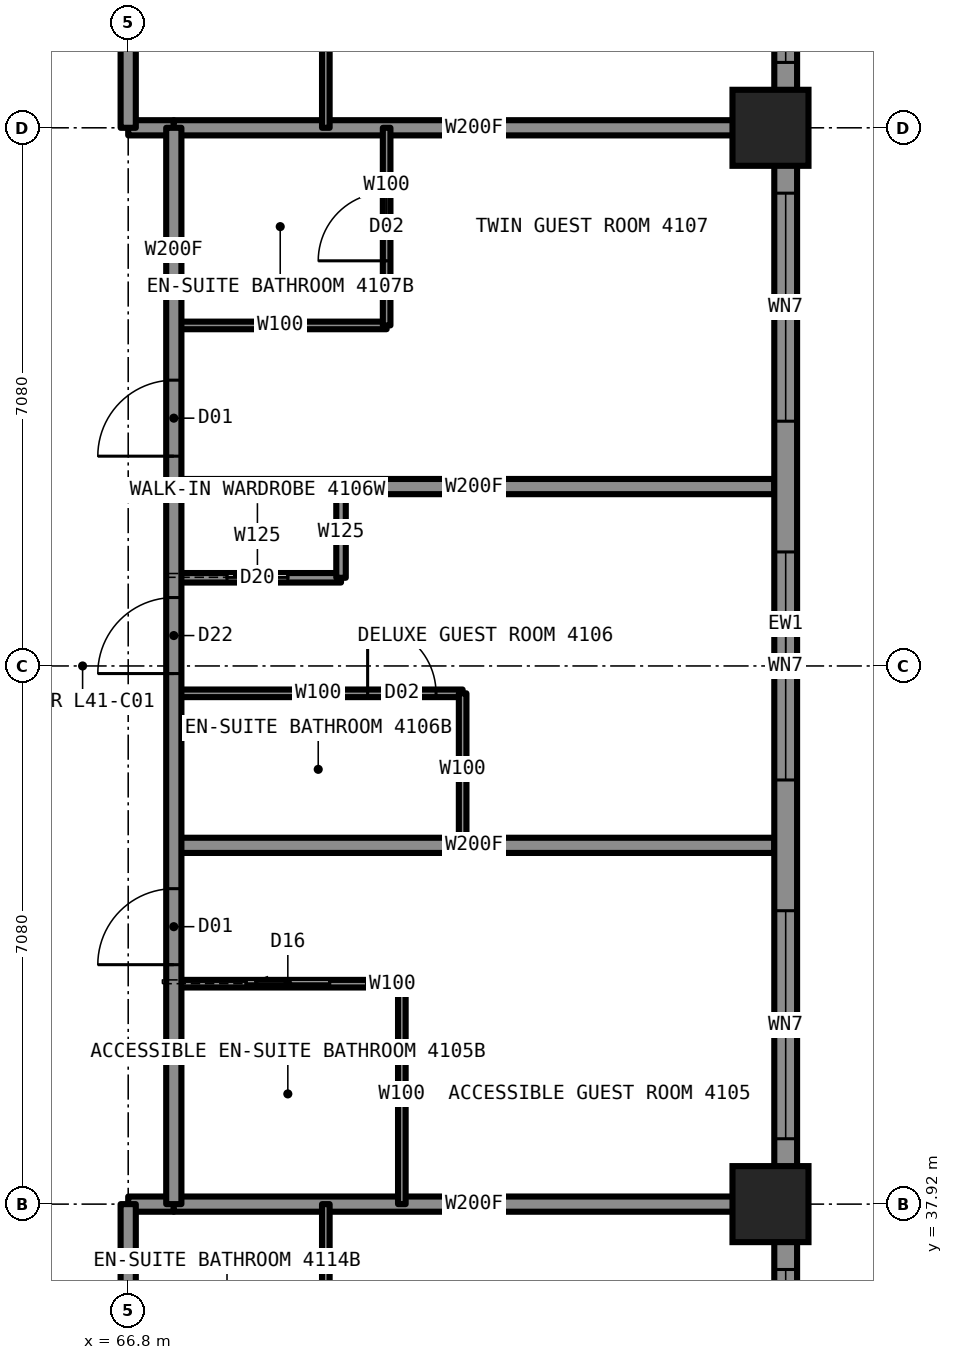
"""IFC4 building model, lengths in metres.
Left out: names, types, materials, properties, quantities, classifications, styles, units other than length and angle.
Written with IfcOpenShell. Run it as: python <this file> out.ifc"""

import sys

from ifc_helpers import new_model, si_unit, direction, frame, frame_2d, origin, origin_2d, place, context, subcontext, project, spatial, rectangle, i_section, extrude, element, fill, save


model = new_model("IFC4")
c1 = context("Model", 3, precision=1e-05, world=origin(), true_north=direction((0.0, 1.0)))
c2 = subcontext(c1, "Body", "Model", "MODEL_VIEW")
j1 = project(units=[si_unit("LENGTHUNIT", "METRE"), si_unit("PLANEANGLEUNIT", "RADIAN")], contexts=[c1])
p1 = place(None, origin())
s1 = spatial("IfcSite", under=j1, at=p1, CompositionType="ELEMENT")
p2 = place(p1, origin())
s2 = spatial("IfcBuilding", under=s1, at=p2, CompositionType="ELEMENT")
p3 = place(p2, frame((0.0, 0.0, 145.9)))
s3 = spatial("IfcBuildingStorey", under=s2, at=p3, CompositionType="ELEMENT", Elevation=145.9)
for number, where, z_axis, x_axis in (
    (1, (75.25, 37.92, 0.0), (0.0, 0.0, 1.0), (1.0, 0.0, 0.0)),
    (2, (75.25, 52.08, 0.0), (0.0, 0.0, 1.0), (1.0, 0.0, 0.0)),
):
    element("IfcColumn", number, at=place(p3, frame(where, z_axis=z_axis, x_axis=x_axis)), inside=s3, PredefinedType="COLUMN", context=c2, shape_type="SweptSolid", body=[
        extrude(i_section(OverallWidth=0.422, OverallDepth=0.465, WebThickness=0.045, FlangeThickness=0.073, at=origin_2d()), origin(), (0.0, 0.0, 1.0), 3.5),
    ])
p4 = place(p3, frame((66.8, 44.64, 0.0), z_axis=(0.0, 0.0, 1.0), x_axis=(1.0, 0.0, 0.0)))
e3 = element("IfcWall", 3, at=p4, inside=s3, PredefinedType="PARTITIONING", context=c2, shape_type="SweptSolid", body=[
    extrude(rectangle(XDim=3.8, YDim=0.1, at=frame_2d((1.9, 0.0))), origin(), (0.0, 0.0, 1.0), 3.33),
])
p5 = place(p4, frame((2.55, 0.0, 0.0)))
e4 = element("IfcOpeningElement", 4, at=p5, cuts=e3, PredefinedType="OPENING", context=c2, shape_type="SweptSolid", body=[
    extrude(rectangle(XDim=0.9, YDim=2.1, at=frame_2d((0.45, 1.05))), frame((0.0, 0.06, 0.0), z_axis=(0.0, -1.0, 0.0), x_axis=(1.0, 0.0, 0.0)), (0.0, 0.0, 1.0), 0.12),
])
p6 = place(p3, frame((66.8, 42.64, 0.0), z_axis=(0.0, 0.0, 1.0), x_axis=(1.0, 0.0, 0.0)))
e5 = element("IfcWall", 5, at=p6, inside=s3, PredefinedType="PARTITIONING", context=c2, shape_type="SweptSolid", body=[
    extrude(rectangle(XDim=8.5, YDim=0.2, at=frame_2d((4.25, 0.0))), origin(), (0.0, 0.0, 1.0), 2.731),
])
p7 = place(p3, frame((66.8, 40.82, 0.0), z_axis=(0.0, 0.0, 1.0), x_axis=(1.0, 0.0, 0.0)))
e6 = element("IfcWall", 6, at=p7, inside=s3, PredefinedType="PARTITIONING", context=c2, shape_type="SweptSolid", body=[
    extrude(rectangle(XDim=3.0, YDim=0.1, at=frame_2d((1.5, 0.0))), origin(), (0.0, 0.0, 1.0), 3.33),
])
p8 = place(p7, frame((0.95, 0.0, 0.0)))
e7 = element("IfcOpeningElement", 7, at=p8, cuts=e6, PredefinedType="OPENING", context=c2, shape_type="SweptSolid", body=[
    extrude(rectangle(XDim=1.1, YDim=2.1, at=frame_2d((0.55, 1.05))), frame((0.0, 0.06, 0.0), z_axis=(0.0, -1.0, 0.0), x_axis=(1.0, 0.0, 0.0)), (0.0, 0.0, 1.0), 0.12),
])
p9 = place(p3, frame((66.8, 37.92, 0.0), z_axis=(0.0, 0.0, 1.0), x_axis=(1.0, 0.0, 0.0)))
e8 = element("IfcWall", 8, at=p9, inside=s3, PredefinedType="PARTITIONING", context=c2, shape_type="SweptSolid", body=[
    extrude(rectangle(XDim=8.5, YDim=0.2, at=frame_2d((4.25, 0.0))), origin(), (0.0, 0.0, 1.0), 2.573),
])
p10 = place(p3, frame((66.8, 46.16, 0.0), z_axis=(0.0, 0.0, 1.0), x_axis=(1.0, 0.0, 0.0)))
e9 = element("IfcWall", 9, at=p10, inside=s3, PredefinedType="PARTITIONING", context=c2, shape_type="SweptSolid", body=[
    extrude(rectangle(XDim=2.2, YDim=0.125, at=frame_2d((1.1, 0.0))), origin(), (0.0, 0.0, 1.0), 3.33),
])
p11 = place(p10, frame((0.7, 0.0, 0.0)))
e10 = element("IfcOpeningElement", 10, at=p11, cuts=e9, PredefinedType="OPENING", context=c2, shape_type="SweptSolid", body=[
    extrude(rectangle(XDim=0.8, YDim=2.1, at=frame_2d((0.4, 1.05))), frame((0.0, 0.073, 0.0), z_axis=(0.0, -1.0, 0.0), x_axis=(1.0, 0.0, 0.0)), (0.0, 0.0, 1.0), 0.145),
])
p12 = place(p3, frame((66.8, 47.36, 0.0), z_axis=(0.0, 0.0, 1.0), x_axis=(1.0, 0.0, 0.0)))
e11 = element("IfcWall", 11, at=p12, inside=s3, PredefinedType="PARTITIONING", context=c2, shape_type="SweptSolid", body=[
    extrude(rectangle(XDim=8.5, YDim=0.2, at=frame_2d((4.25, 0.0))), origin(), (0.0, 0.0, 1.0), 2.731),
])
p13 = place(p3, frame((66.8, 49.48, 0.0), z_axis=(0.0, 0.0, 1.0), x_axis=(1.0, 0.0, 0.0)))
e12 = element("IfcWall", 12, at=p13, inside=s3, PredefinedType="PARTITIONING", context=c2, shape_type="SweptSolid", body=[
    extrude(rectangle(XDim=2.8, YDim=0.1, at=frame_2d((1.4, 0.0))), origin(), (0.0, 0.0, 1.0), 3.33),
])
p14 = place(p3, frame((66.8, 52.08, 0.0), z_axis=(0.0, 0.0, 1.0), x_axis=(1.0, 0.0, 0.0)))
e13 = element("IfcWall", 13, at=p14, inside=s3, PredefinedType="PARTITIONING", context=c2, shape_type="SweptSolid", body=[
    extrude(rectangle(XDim=2.6, YDim=0.2, at=frame_2d((1.3, 0.0))), origin(), (0.0, 0.0, 1.0), 2.573),
])
p15 = place(p3, frame((69.6, 52.08, 0.0), z_axis=(0.0, 0.0, 1.0), x_axis=(1.0, 0.0, 0.0)))
e14 = element("IfcWall", 14, at=p15, inside=s3, PredefinedType="PARTITIONING", context=c2, shape_type="SweptSolid", body=[
    extrude(rectangle(XDim=5.7, YDim=0.2, at=frame_2d((2.85, 0.0))), origin(), (0.0, 0.0, 1.0), 2.573),
])
p16 = place(p3, frame((66.8, 33.2, 0.0), z_axis=(0.0, 0.0, 1.0), x_axis=(0.0, 1.0, 0.0)))
e15 = element("IfcWall", 15, at=p16, inside=s3, PredefinedType="PARTITIONING", context=c2, shape_type="SweptSolid", body=[
    extrude(rectangle(XDim=23.6, YDim=0.2, at=frame_2d((11.8, 0.0))), origin(), (0.0, 0.0, 1.0), 3.33),
])
p17 = place(p16, frame((7.87, 0.0, 0.0)))
e16 = element("IfcOpeningElement", 16, at=p17, cuts=e15, PredefinedType="OPENING", context=c2, shape_type="SweptSolid", body=[
    extrude(rectangle(XDim=1.0, YDim=2.2, at=frame_2d((0.5, 1.1))), frame((0.0, 0.11, 0.0), z_axis=(0.0, -1.0, 0.0), x_axis=(1.0, 0.0, 0.0)), (0.0, 0.0, 1.0), 0.22),
])
p18 = place(p16, frame((11.7, 0.0, 0.0)))
e17 = element("IfcOpeningElement", 17, at=p18, cuts=e15, PredefinedType="OPENING", context=c2, shape_type="SweptSolid", body=[
    extrude(rectangle(XDim=1.0, YDim=2.2, at=frame_2d((0.5, 1.1))), frame((0.0, 0.11, 0.0), z_axis=(0.0, -1.0, 0.0), x_axis=(1.0, 0.0, 0.0)), (0.0, 0.0, 1.0), 0.22),
])
p19 = place(p16, frame((14.56, 0.0, 0.0)))
e18 = element("IfcOpeningElement", 18, at=p19, cuts=e15, PredefinedType="OPENING", context=c2, shape_type="SweptSolid", body=[
    extrude(rectangle(XDim=1.0, YDim=2.2, at=frame_2d((0.5, 1.1))), frame((0.0, 0.11, 0.0), z_axis=(0.0, -1.0, 0.0), x_axis=(1.0, 0.0, 0.0)), (0.0, 0.0, 1.0), 0.22),
])
p20 = place(p16, frame((21.84, 0.0, 0.0)))
e19 = element("IfcOpeningElement", 19, at=p20, cuts=e15, PredefinedType="OPENING", context=c2, shape_type="SweptSolid", body=[
    extrude(rectangle(XDim=1.1, YDim=2.2, at=frame_2d((0.55, 1.1))), frame((0.0, 0.11, 0.0), z_axis=(0.0, -1.0, 0.0), x_axis=(1.0, 0.0, 0.0)), (0.0, 0.0, 1.0), 0.22),
])
p21 = place(p16, frame((0.66, 0.0, 0.0)))
e20 = element("IfcOpeningElement", 20, at=p21, cuts=e15, PredefinedType="OPENING", context=c2, shape_type="SweptSolid", body=[
    extrude(rectangle(XDim=1.1, YDim=2.2, at=frame_2d((0.55, 1.1))), frame((0.0, 0.11, 0.0), z_axis=(0.0, -1.0, 0.0), x_axis=(1.0, 0.0, 0.0)), (0.0, 0.0, 1.0), 0.22),
])
p22 = place(p3, frame((69.0, 46.16, 0.0), z_axis=(0.0, 0.0, 1.0), x_axis=(0.0, 1.0, 0.0)))
e21 = element("IfcWall", 21, at=p22, inside=s3, PredefinedType="PARTITIONING", context=c2, shape_type="SweptSolid", body=[
    extrude(rectangle(XDim=1.2, YDim=0.125, at=frame_2d((0.6, 0.0))), origin(), (0.0, 0.0, 1.0), 3.33),
])
for number, where, z_axis, x_axis in (
    (22, (69.4, 35.32, 0.0), (0.0, 0.0, 1.0), (0.0, 1.0, 0.0)),
    (23, (69.4, 52.08, 0.0), (0.0, 0.0, 1.0), (0.0, 1.0, 0.0)),
):
    element("IfcWall", number, at=place(p3, frame(where, z_axis=z_axis, x_axis=x_axis)), inside=s3, PredefinedType="PARTITIONING", context=c2, shape_type="SweptSolid", body=[
        extrude(rectangle(XDim=2.6, YDim=0.1, at=frame_2d((1.3, 0.0))), origin(), (0.0, 0.0, 1.0), 3.33),
    ])
p23 = place(p3, frame((69.6, 49.48, 0.0), z_axis=(0.0, 0.0, 1.0), x_axis=(0.0, 1.0, 0.0)))
e24 = element("IfcWall", 24, at=p23, inside=s3, PredefinedType="PARTITIONING", context=c2, shape_type="SweptSolid", body=[
    extrude(rectangle(XDim=2.6, YDim=0.1, at=frame_2d((1.3, 0.0))), origin(), (0.0, 0.0, 1.0), 3.33),
])
p24 = place(p23, frame((0.85, 0.0, 0.0)))
e25 = element("IfcOpeningElement", 25, at=p24, cuts=e24, PredefinedType="OPENING", context=c2, shape_type="SweptSolid", body=[
    extrude(rectangle(XDim=0.9, YDim=2.1, at=frame_2d((0.45, 1.05))), frame((0.0, 0.06, 0.0), z_axis=(0.0, -1.0, 0.0), x_axis=(1.0, 0.0, 0.0)), (0.0, 0.0, 1.0), 0.12),
])
p25 = place(p3, frame((69.8, 37.92, 0.0), z_axis=(0.0, 0.0, 1.0), x_axis=(0.0, 1.0, 0.0)))
e26 = element("IfcWall", 26, at=p25, inside=s3, PredefinedType="PARTITIONING", context=c2, shape_type="SweptSolid", body=[
    extrude(rectangle(XDim=2.9, YDim=0.1, at=frame_2d((1.45, 0.0))), origin(), (0.0, 0.0, 1.0), 3.33),
])
p26 = place(p3, frame((70.6, 42.64, 0.0), z_axis=(0.0, 0.0, 1.0), x_axis=(0.0, 1.0, 0.0)))
e27 = element("IfcWall", 27, at=p26, inside=s3, PredefinedType="PARTITIONING", context=c2, shape_type="SweptSolid", body=[
    extrude(rectangle(XDim=2.0, YDim=0.1, at=frame_2d((1.0, 0.0))), origin(), (0.0, 0.0, 1.0), 3.33),
])
p27 = place(p3, frame((75.45, 29.9, 0.0), z_axis=(0.0, 0.0, 1.0), x_axis=(0.0, 1.0, 0.0)))
e28 = element("IfcWall", 28, at=p27, inside=s3, PredefinedType="SOLIDWALL", context=c2, shape_type="SweptSolid", body=[
    extrude(rectangle(XDim=30.2, YDim=0.3, at=frame_2d((15.1, 0.0))), origin(), (0.0, 0.0, 1.0), 2.83),
])
p28 = place(p27, frame((1.3, 0.0, 0.8)))
e29 = element("IfcOpeningElement", 29, at=p28, cuts=e28, PredefinedType="OPENING", context=c2, shape_type="SweptSolid", body=[
    extrude(rectangle(XDim=1.1, YDim=1.7, at=frame_2d((0.55, 0.85))), frame((0.0, 0.16, 0.0), z_axis=(0.0, -1.0, 0.0), x_axis=(1.0, 0.0, 0.0)), (0.0, 0.0, 1.0), 0.32),
])
p29 = place(p27, frame((4.16, 0.0, 0.5)))
e30 = element("IfcOpeningElement", 30, at=p29, cuts=e28, PredefinedType="OPENING", context=c2, shape_type="SweptSolid", body=[
    extrude(rectangle(XDim=3.0, YDim=2.0, at=frame_2d((1.5, 1.0))), frame((0.0, 0.16, 0.0), z_axis=(0.0, -1.0, 0.0), x_axis=(1.0, 0.0, 0.0)), (0.0, 0.0, 1.0), 0.32),
])
p30 = place(p27, frame((8.88, 0.0, 0.5)))
e31 = element("IfcOpeningElement", 31, at=p30, cuts=e28, PredefinedType="OPENING", context=c2, shape_type="SweptSolid", body=[
    extrude(rectangle(XDim=3.0, YDim=2.0, at=frame_2d((1.5, 1.0))), frame((0.0, 0.16, 0.0), z_axis=(0.0, -1.0, 0.0), x_axis=(1.0, 0.0, 0.0)), (0.0, 0.0, 1.0), 0.32),
])
p31 = place(p27, frame((13.6, 0.0, 0.5)))
e32 = element("IfcOpeningElement", 32, at=p31, cuts=e28, PredefinedType="OPENING", context=c2, shape_type="SweptSolid", body=[
    extrude(rectangle(XDim=3.0, YDim=2.0, at=frame_2d((1.5, 1.0))), frame((0.0, 0.16, 0.0), z_axis=(0.0, -1.0, 0.0), x_axis=(1.0, 0.0, 0.0)), (0.0, 0.0, 1.0), 0.32),
])
p32 = place(p27, frame((18.32, 0.0, 0.5)))
e33 = element("IfcOpeningElement", 33, at=p32, cuts=e28, PredefinedType="OPENING", context=c2, shape_type="SweptSolid", body=[
    extrude(rectangle(XDim=3.0, YDim=2.0, at=frame_2d((1.5, 1.0))), frame((0.0, 0.16, 0.0), z_axis=(0.0, -1.0, 0.0), x_axis=(1.0, 0.0, 0.0)), (0.0, 0.0, 1.0), 0.32),
])
p33 = place(p27, frame((23.04, 0.0, 0.5)))
e34 = element("IfcOpeningElement", 34, at=p33, cuts=e28, PredefinedType="OPENING", context=c2, shape_type="SweptSolid", body=[
    extrude(rectangle(XDim=3.0, YDim=2.0, at=frame_2d((1.5, 1.0))), frame((0.0, 0.16, 0.0), z_axis=(0.0, -1.0, 0.0), x_axis=(1.0, 0.0, 0.0)), (0.0, 0.0, 1.0), 0.32),
])
p34 = place(p27, frame((27.75, 0.0, 0.8)))
e35 = element("IfcOpeningElement", 35, at=p34, cuts=e28, PredefinedType="OPENING", context=c2, shape_type="SweptSolid", body=[
    extrude(rectangle(XDim=1.1, YDim=1.7, at=frame_2d((0.55, 0.85))), frame((0.0, 0.16, 0.0), z_axis=(0.0, -1.0, 0.0), x_axis=(1.0, 0.0, 0.0)), (0.0, 0.0, 1.0), 0.32),
])
p35 = place(p17, origin())
e36 = element("IfcDoor", 36, at=p35, inside=s3, OperationType="SINGLE_SWING_LEFT", PredefinedType="DOOR", context=c2, shape_type="SweptSolid", body=[
    extrude(rectangle(XDim=1.0, YDim=2.2, at=frame_2d((0.5, 1.1))), frame((0.0, 0.025, 0.0), z_axis=(0.0, -1.0, 0.0), x_axis=(1.0, 0.0, 0.0)), (0.0, 0.0, 1.0), 0.05),
])
fill(e16, e36)
p36 = place(p8, origin())
e37 = element("IfcDoor", 37, at=p36, inside=s3, OperationType="SLIDING_TO_LEFT", PredefinedType="DOOR", context=c2, shape_type="SweptSolid", body=[
    extrude(rectangle(XDim=1.1, YDim=2.1, at=frame_2d((0.55, 1.05))), frame((0.0, 0.025, 0.0), z_axis=(0.0, -1.0, 0.0), x_axis=(1.0, 0.0, 0.0)), (0.0, 0.0, 1.0), 0.05),
])
fill(e7, e37)
p37 = place(p18, origin())
e38 = element("IfcDoor", 38, at=p37, inside=s3, OperationType="SINGLE_SWING_LEFT", PredefinedType="DOOR", context=c2, shape_type="SweptSolid", body=[
    extrude(rectangle(XDim=1.0, YDim=2.2, at=frame_2d((0.5, 1.1))), frame((0.0, 0.025, 0.0), z_axis=(0.0, -1.0, 0.0), x_axis=(1.0, 0.0, 0.0)), (0.0, 0.0, 1.0), 0.05),
])
fill(e17, e38)
p38 = place(p5, origin())
e39 = element("IfcDoor", 39, at=p38, inside=s3, OperationType="SINGLE_SWING_RIGHT", PredefinedType="DOOR", context=c2, shape_type="SweptSolid", body=[
    extrude(rectangle(XDim=0.9, YDim=2.1, at=frame_2d((0.45, 1.05))), frame((0.0, 0.025, 0.0), z_axis=(0.0, -1.0, 0.0), x_axis=(1.0, 0.0, 0.0)), (0.0, 0.0, 1.0), 0.05),
])
fill(e4, e39)
p39 = place(p11, origin())
e40 = element("IfcDoor", 40, at=p39, inside=s3, OperationType="SLIDING_TO_LEFT", PredefinedType="DOOR", context=c2, shape_type="SweptSolid", body=[
    extrude(rectangle(XDim=0.8, YDim=2.1, at=frame_2d((0.4, 1.05))), frame((0.0, 0.025, 0.0), z_axis=(0.0, -1.0, 0.0), x_axis=(1.0, 0.0, 0.0)), (0.0, 0.0, 1.0), 0.05),
])
fill(e10, e40)
p40 = place(p19, origin())
e41 = element("IfcDoor", 41, at=p40, inside=s3, OperationType="SINGLE_SWING_LEFT", PredefinedType="DOOR", context=c2, shape_type="SweptSolid", body=[
    extrude(rectangle(XDim=1.0, YDim=2.2, at=frame_2d((0.5, 1.1))), frame((0.0, 0.025, 0.0), z_axis=(0.0, -1.0, 0.0), x_axis=(1.0, 0.0, 0.0)), (0.0, 0.0, 1.0), 0.05),
])
fill(e18, e41)
p41 = place(p24, origin())
e42 = element("IfcDoor", 42, at=p41, inside=s3, OperationType="SINGLE_SWING_RIGHT", PredefinedType="DOOR", context=c2, shape_type="SweptSolid", body=[
    extrude(rectangle(XDim=0.9, YDim=2.1, at=frame_2d((0.45, 1.05))), frame((0.0, 0.025, 0.0), z_axis=(0.0, -1.0, 0.0), x_axis=(1.0, 0.0, 0.0)), (0.0, 0.0, 1.0), 0.05),
])
fill(e25, e42)
p42 = place(p29, origin())
e43 = element("IfcWindow", 43, at=p42, inside=s3, PartitioningType="SINGLE_PANEL", PredefinedType="WINDOW", context=c2, shape_type="SweptSolid", body=[
    extrude(rectangle(XDim=3.0, YDim=2.0, at=frame_2d((1.5, 1.0))), frame((0.0, 0.03, 0.0), z_axis=(0.0, -1.0, 0.0), x_axis=(1.0, 0.0, 0.0)), (0.0, 0.0, 1.0), 0.06),
])
fill(e30, e43)
p43 = place(p30, origin())
e44 = element("IfcWindow", 44, at=p43, inside=s3, PartitioningType="SINGLE_PANEL", PredefinedType="WINDOW", context=c2, shape_type="SweptSolid", body=[
    extrude(rectangle(XDim=3.0, YDim=2.0, at=frame_2d((1.5, 1.0))), frame((0.0, 0.03, 0.0), z_axis=(0.0, -1.0, 0.0), x_axis=(1.0, 0.0, 0.0)), (0.0, 0.0, 1.0), 0.06),
])
fill(e31, e44)
p44 = place(p31, origin())
e45 = element("IfcWindow", 45, at=p44, inside=s3, PartitioningType="SINGLE_PANEL", PredefinedType="WINDOW", context=c2, shape_type="SweptSolid", body=[
    extrude(rectangle(XDim=3.0, YDim=2.0, at=frame_2d((1.5, 1.0))), frame((0.0, 0.03, 0.0), z_axis=(0.0, -1.0, 0.0), x_axis=(1.0, 0.0, 0.0)), (0.0, 0.0, 1.0), 0.06),
])
fill(e32, e45)
p45 = place(p32, origin())
e46 = element("IfcWindow", 46, at=p45, inside=s3, PartitioningType="SINGLE_PANEL", PredefinedType="WINDOW", context=c2, shape_type="SweptSolid", body=[
    extrude(rectangle(XDim=3.0, YDim=2.0, at=frame_2d((1.5, 1.0))), frame((0.0, 0.03, 0.0), z_axis=(0.0, -1.0, 0.0), x_axis=(1.0, 0.0, 0.0)), (0.0, 0.0, 1.0), 0.06),
])
fill(e33, e46)
p46 = place(p33, origin())
e47 = element("IfcWindow", 47, at=p46, inside=s3, PartitioningType="SINGLE_PANEL", PredefinedType="WINDOW", context=c2, shape_type="SweptSolid", body=[
    extrude(rectangle(XDim=3.0, YDim=2.0, at=frame_2d((1.5, 1.0))), frame((0.0, 0.03, 0.0), z_axis=(0.0, -1.0, 0.0), x_axis=(1.0, 0.0, 0.0)), (0.0, 0.0, 1.0), 0.06),
])
fill(e34, e47)
save(model, sys.argv[1])
